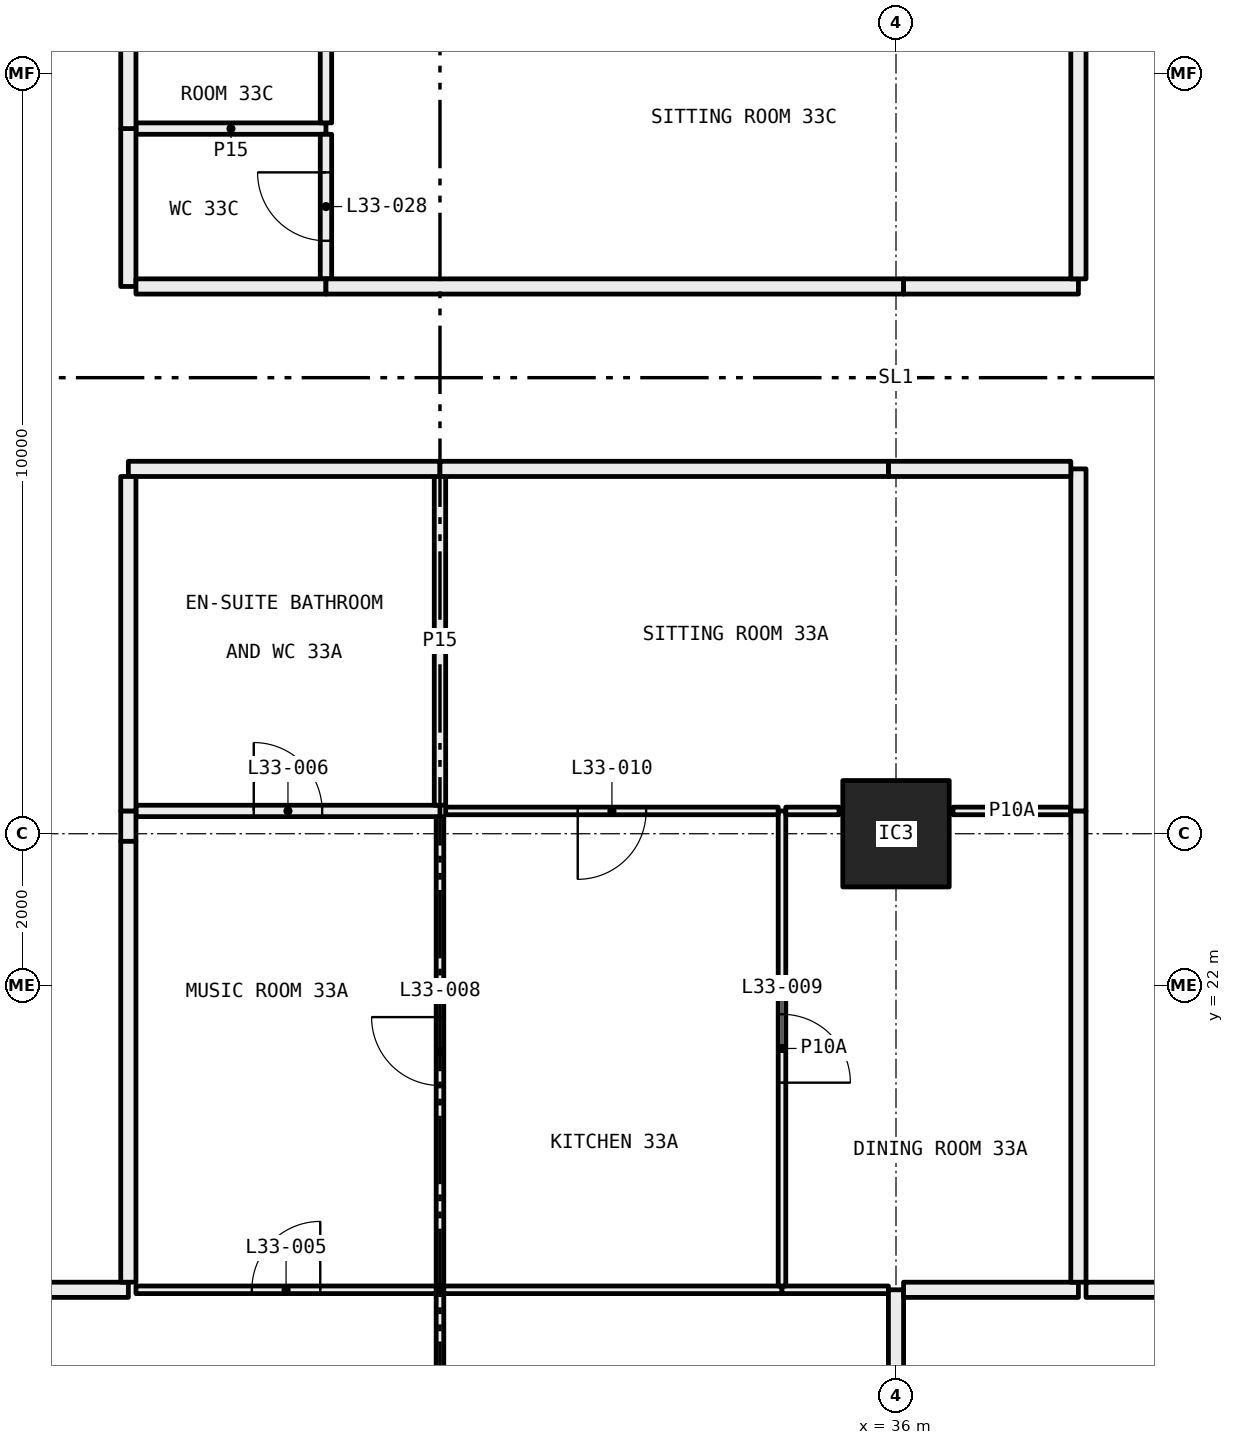
"""IFC4 building model, lengths in metres.
Left out: names, types, materials, properties, quantities, classifications, styles, units other than length and angle.
Written with IfcOpenShell. Run it as: python <this file> out.ifc"""

import sys

from ifc_helpers import new_model, si_unit, direction, frame, frame_2d, origin, origin_2d, place, context, subcontext, project, spatial, rectangle, hollow_rectangle, extrude, element, fill, save


model = new_model("IFC4")
c1 = context("Model", 3, precision=1e-05, world=origin(), true_north=direction((0.0, 1.0)))
c2 = subcontext(c1, "Body", "Model", "MODEL_VIEW")
j1 = project(units=[si_unit("LENGTHUNIT", "METRE"), si_unit("PLANEANGLEUNIT", "RADIAN")], contexts=[c1])
p1 = place(None, origin())
s1 = spatial("IfcSite", under=j1, at=p1, CompositionType="ELEMENT")
p2 = place(p1, origin())
s2 = spatial("IfcBuilding", under=s1, at=p2, CompositionType="ELEMENT")
p3 = place(p2, frame((0.0, 0.0, 127.65)))
s3 = spatial("IfcBuildingStorey", under=s2, at=p3, CompositionType="ELEMENT", Elevation=127.65)
p4 = place(p3, frame((36.0, 24.0, 0.0), z_axis=(0.0, 0.0, 1.0), x_axis=(1.0, 0.0, 0.0)))
e1 = element("IfcColumn", 1, at=p4, inside=s3, PredefinedType="COLUMN", context=c2, shape_type="SweptSolid", body=[
    extrude(hollow_rectangle(XDim=1.4, YDim=1.4, WallThickness=0.06, at=origin_2d()), origin(), (0.0, 0.0, 1.0), 3.05),
])
p5 = place(p3, frame((30.0, 12.72, 0.0), z_axis=(0.0, 0.0, 1.0), x_axis=(0.0, 1.0, 0.0)))
e2 = element("IfcWall", 2, at=p5, inside=s3, PredefinedType="PARTITIONING", context=c2, shape_type="SweptSolid", body=[
    extrude(rectangle(XDim=5.28, YDim=0.1, at=frame_2d((2.64, 0.0))), origin(), (0.0, 0.0, 1.0), 3.05),
])
p6 = place(p5, frame((2.19, 0.0, 0.0)))
e3 = element("IfcOpeningElement", 3, at=p6, cuts=e2, PredefinedType="OPENING", context=c2, shape_type="SweptSolid", body=[
    extrude(rectangle(XDim=0.9, YDim=2.1, at=frame_2d((0.45, 1.05))), frame((0.0, 0.06, 0.0), z_axis=(0.0, -1.0, 0.0), x_axis=(1.0, 0.0, 0.0)), (0.0, 0.0, 1.0), 0.12),
])
p7 = place(p3, frame((29.95, 18.0, 0.0), z_axis=(0.0, 0.0, 1.0), x_axis=(-1.0, 0.0, 0.0)))
e4 = element("IfcWall", 4, at=p7, inside=s3, PredefinedType="PARTITIONING", context=c2, shape_type="SweptSolid", body=[
    extrude(rectangle(XDim=3.95, YDim=0.1, at=frame_2d((1.975, 0.0))), origin(), (0.0, 0.0, 1.0), 3.05),
])
p8 = place(p7, frame((1.525, 0.0, 0.0)))
e5 = element("IfcOpeningElement", 5, at=p8, cuts=e4, PredefinedType="OPENING", context=c2, shape_type="SweptSolid", body=[
    extrude(rectangle(XDim=0.9, YDim=2.1, at=frame_2d((0.45, 1.05))), frame((0.0, 0.06, 0.0), z_axis=(0.0, -1.0, 0.0), x_axis=(1.0, 0.0, 0.0)), (0.0, 0.0, 1.0), 0.12),
])
p9 = place(p3, frame((25.9, 18.0, 0.0), z_axis=(0.0, 0.0, 1.0), x_axis=(-1.0, 0.0, 0.0)))
e6 = element("IfcWall", 6, at=p9, inside=s3, PredefinedType="PARTITIONING", context=c2, shape_type="SweptSolid", body=[
    extrude(rectangle(XDim=1.9, YDim=0.2, at=frame_2d((0.95, 0.0))), origin(), (0.0, 0.0, 1.0), 3.05),
])
p10 = place(p3, frame((34.5, 18.0, 0.0), z_axis=(0.0, 0.0, 1.0), x_axis=(-1.0, 0.0, 0.0)))
e7 = element("IfcWall", 7, at=p10, inside=s3, PredefinedType="PARTITIONING", context=c2, shape_type="SweptSolid", body=[
    extrude(rectangle(XDim=4.45, YDim=0.1, at=frame_2d((2.225, 0.0))), origin(), (0.0, 0.0, 1.0), 3.05),
])
p11 = place(p3, frame((35.9, 18.0, 0.0), z_axis=(0.0, 0.0, 1.0), x_axis=(-1.0, 0.0, 0.0)))
e8 = element("IfcWall", 8, at=p11, inside=s3, PredefinedType="PARTITIONING", context=c2, shape_type="SweptSolid", body=[
    extrude(rectangle(XDim=1.4, YDim=0.1, at=frame_2d((0.7, 0.0))), origin(), (0.0, 0.0, 1.0), 3.05),
])
p12 = place(p3, frame((36.0, 12.72, 0.0), z_axis=(0.0, 0.0, 1.0), x_axis=(0.0, 1.0, 0.0)))
e9 = element("IfcWall", 9, at=p12, inside=s3, PredefinedType="PARTITIONING", context=c2, shape_type="SweptSolid", body=[
    extrude(rectangle(XDim=5.28, YDim=0.2, at=frame_2d((2.64, 0.0))), origin(), (0.0, 0.0, 1.0), 2.45),
])
p13 = place(p3, frame((30.0, 18.05, 0.0), z_axis=(0.0, 0.0, 1.0), x_axis=(0.0, 1.0, 0.0)))
e10 = element("IfcWall", 10, at=p13, inside=s3, PredefinedType="PARTITIONING", context=c2, shape_type="SweptSolid", body=[
    extrude(rectangle(XDim=6.175, YDim=0.1, at=frame_2d((3.087, 0.0))), origin(), (0.0, 0.0, 1.0), 2.45),
])
p14 = place(p13, frame((2.637, 0.0, 0.0)))
e11 = element("IfcOpeningElement", 11, at=p14, cuts=e10, PredefinedType="OPENING", context=c2, shape_type="SweptSolid", body=[
    extrude(rectangle(XDim=0.9, YDim=2.1, at=frame_2d((0.45, 1.05))), frame((0.0, 0.06, 0.0), z_axis=(0.0, -1.0, 0.0), x_axis=(1.0, 0.0, 0.0)), (0.0, 0.0, 1.0), 0.12),
])
p15 = place(p3, frame((30.0, 24.3, 0.0), z_axis=(0.0, 0.0, 1.0), x_axis=(-1.0, 0.0, 0.0)))
e12 = element("IfcWall", 12, at=p15, inside=s3, PredefinedType="PARTITIONING", context=c2, shape_type="SweptSolid", body=[
    extrude(rectangle(XDim=4.0, YDim=0.15, at=frame_2d((2.0, 0.0))), origin(), (0.0, 0.0, 1.0), 3.05),
])
p16 = place(p15, frame((1.55, 0.0, 0.0)))
e13 = element("IfcOpeningElement", 13, at=p16, cuts=e12, PredefinedType="OPENING", context=c2, shape_type="SweptSolid", body=[
    extrude(rectangle(XDim=0.9, YDim=2.1, at=frame_2d((0.45, 1.05))), frame((0.0, 0.085, 0.0), z_axis=(0.0, -1.0, 0.0), x_axis=(1.0, 0.0, 0.0)), (0.0, 0.0, 1.0), 0.17),
])
p17 = place(p3, frame((25.9, 24.3, 0.0), z_axis=(0.0, 0.0, 1.0), x_axis=(0.0, -1.0, 0.0)))
e14 = element("IfcWall", 14, at=p17, inside=s3, PredefinedType="PARTITIONING", context=c2, shape_type="SweptSolid", body=[
    extrude(rectangle(XDim=0.4, YDim=0.2, at=frame_2d((0.2, 0.0))), origin(), (0.0, 0.0, 1.0), 2.45),
])
p18 = place(p3, frame((25.9, 23.9, 0.0), z_axis=(0.0, 0.0, 1.0), x_axis=(0.0, -1.0, 0.0)))
e15 = element("IfcWall", 15, at=p18, inside=s3, PredefinedType="PARTITIONING", context=c2, shape_type="SweptSolid", body=[
    extrude(rectangle(XDim=5.8, YDim=0.2, at=frame_2d((2.9, 0.0))), origin(), (0.0, 0.0, 1.0), 3.05),
])
p19 = place(p3, frame((34.5, 18.05, 0.0), z_axis=(0.0, 0.0, 1.0), x_axis=(0.0, 1.0, 0.0)))
e16 = element("IfcWall", 16, at=p19, inside=s3, PredefinedType="PARTITIONING", context=c2, shape_type="SweptSolid", body=[
    extrude(rectangle(XDim=6.25, YDim=0.1, at=frame_2d((3.125, 0.0))), origin(), (0.0, 0.0, 1.0), 2.45),
])
p20 = place(p19, frame((2.675, 0.0, 0.0)))
e17 = element("IfcOpeningElement", 17, at=p20, cuts=e16, PredefinedType="OPENING", context=c2, shape_type="SweptSolid", body=[
    extrude(rectangle(XDim=0.9, YDim=2.1, at=frame_2d((0.45, 1.05))), frame((0.0, 0.06, 0.0), z_axis=(0.0, -1.0, 0.0), x_axis=(1.0, 0.0, 0.0)), (0.0, 0.0, 1.0), 0.12),
])
p21 = place(p3, frame((34.45, 24.3, 0.0), z_axis=(0.0, 0.0, 1.0), x_axis=(-1.0, 0.0, 0.0)))
e18 = element("IfcWall", 18, at=p21, inside=s3, PredefinedType="PARTITIONING", context=c2, shape_type="SweptSolid", body=[
    extrude(rectangle(XDim=4.375, YDim=0.1, at=frame_2d((2.188, 0.0))), origin(), (0.0, 0.0, 1.0), 3.05),
])
p22 = place(p21, frame((1.738, 0.0, 0.0)))
e19 = element("IfcOpeningElement", 19, at=p22, cuts=e18, PredefinedType="OPENING", context=c2, shape_type="SweptSolid", body=[
    extrude(rectangle(XDim=0.9, YDim=2.1, at=frame_2d((0.45, 1.05))), frame((0.0, 0.06, 0.0), z_axis=(0.0, -1.0, 0.0), x_axis=(1.0, 0.0, 0.0)), (0.0, 0.0, 1.0), 0.12),
])
p23 = place(p3, frame((35.25, 24.3, 0.0), z_axis=(0.0, 0.0, 1.0), x_axis=(-1.0, 0.0, 0.0)))
e20 = element("IfcWall", 20, at=p23, inside=s3, PredefinedType="PARTITIONING", context=c2, shape_type="SweptSolid", body=[
    extrude(rectangle(XDim=0.7, YDim=0.1, at=frame_2d((0.35, 0.0))), origin(), (0.0, 0.0, 1.0), 3.05),
])
p24 = place(p3, frame((38.3, 24.3, 0.0), z_axis=(0.0, 0.0, 1.0), x_axis=(-1.0, 0.0, 0.0)))
e21 = element("IfcWall", 21, at=p24, inside=s3, PredefinedType="PARTITIONING", context=c2, shape_type="SweptSolid", body=[
    extrude(rectangle(XDim=1.55, YDim=0.1, at=frame_2d((0.775, 0.0))), origin(), (0.0, 0.0, 1.0), 3.05),
])
p25 = place(p3, frame((36.1, 18.0, 0.0), z_axis=(0.0, 0.0, 1.0), x_axis=(1.0, 0.0, 0.0)))
e22 = element("IfcWall", 22, at=p25, inside=s3, PredefinedType="PARTITIONING", context=c2, shape_type="SweptSolid", body=[
    extrude(rectangle(XDim=2.3, YDim=0.2, at=frame_2d((1.15, 0.0))), origin(), (0.0, 0.0, 1.0), 3.05),
])
p26 = place(p3, frame((38.4, 18.1, 0.0), z_axis=(0.0, 0.0, 1.0), x_axis=(0.0, 1.0, 0.0)))
e23 = element("IfcWall", 23, at=p26, inside=s3, PredefinedType="PARTITIONING", context=c2, shape_type="SweptSolid", body=[
    extrude(rectangle(XDim=6.2, YDim=0.2, at=frame_2d((3.1, 0.0))), origin(), (0.0, 0.0, 1.0), 2.45),
])
p27 = place(p3, frame((30.0, 24.375, 0.0), z_axis=(0.0, 0.0, 1.0), x_axis=(0.0, 1.0, 0.0)))
e24 = element("IfcWall", 24, at=p27, inside=s3, PredefinedType="PARTITIONING", context=c2, shape_type="SweptSolid", body=[
    extrude(rectangle(XDim=4.325, YDim=0.15, at=frame_2d((2.163, 0.0))), origin(), (0.0, 0.0, 1.0), 3.05),
])
p28 = place(p3, frame((30.0, 28.8, 0.0), z_axis=(0.0, 0.0, 1.0), x_axis=(-1.0, 0.0, 0.0)))
e25 = element("IfcWall", 25, at=p28, inside=s3, PredefinedType="PARTITIONING", context=c2, shape_type="SweptSolid", body=[
    extrude(rectangle(XDim=4.1, YDim=0.2, at=frame_2d((2.05, 0.0))), origin(), (0.0, 0.0, 1.0), 3.05),
])
p29 = place(p3, frame((25.9, 28.7, 0.0), z_axis=(0.0, 0.0, 1.0), x_axis=(0.0, -1.0, 0.0)))
e26 = element("IfcWall", 26, at=p29, inside=s3, PredefinedType="PARTITIONING", context=c2, shape_type="SweptSolid", body=[
    extrude(rectangle(XDim=4.4, YDim=0.2, at=frame_2d((2.2, 0.0))), origin(), (0.0, 0.0, 1.0), 3.05),
])
p30 = place(p3, frame((38.4, 24.3, 0.0), z_axis=(0.0, 0.0, 1.0), x_axis=(0.0, 1.0, 0.0)))
e27 = element("IfcWall", 27, at=p30, inside=s3, PredefinedType="PARTITIONING", context=c2, shape_type="SweptSolid", body=[
    extrude(rectangle(XDim=4.5, YDim=0.2, at=frame_2d((2.25, 0.0))), origin(), (0.0, 0.0, 1.0), 3.05),
])
p31 = place(p3, frame((38.3, 28.8, 0.0), z_axis=(0.0, 0.0, 1.0), x_axis=(-1.0, 0.0, 0.0)))
e28 = element("IfcWall", 28, at=p31, inside=s3, PredefinedType="PARTITIONING", context=c2, shape_type="SweptSolid", body=[
    extrude(rectangle(XDim=2.4, YDim=0.2, at=frame_2d((1.2, 0.0))), origin(), (0.0, 0.0, 1.0), 2.45),
])
p32 = place(p3, frame((35.9, 28.8, 0.0), z_axis=(0.0, 0.0, 1.0), x_axis=(-1.0, 0.0, 0.0)))
e29 = element("IfcWall", 29, at=p32, inside=s3, PredefinedType="PARTITIONING", context=c2, shape_type="SweptSolid", body=[
    extrude(rectangle(XDim=5.9, YDim=0.2, at=frame_2d((2.95, 0.0))), origin(), (0.0, 0.0, 1.0), 3.05),
])
p33 = place(p3, frame((40.8, 18.0, 0.0), z_axis=(0.0, 0.0, 1.0), x_axis=(-1.0, 0.0, 0.0)))
e30 = element("IfcWall", 30, at=p33, inside=s3, PredefinedType="PARTITIONING", context=c2, shape_type="SweptSolid", body=[
    extrude(rectangle(XDim=2.3, YDim=0.2, at=frame_2d((1.15, 0.0))), origin(), (0.0, 0.0, 1.0), 3.05),
])
p34 = place(p3, frame((28.5, 33.277, 0.0), z_axis=(0.0, 0.0, 1.0), x_axis=(-1.0, 0.0, 0.0)))
e31 = element("IfcWall", 31, at=p34, inside=s3, PredefinedType="PARTITIONING", context=c2, shape_type="SweptSolid", body=[
    extrude(rectangle(XDim=2.5, YDim=0.15, at=frame_2d((1.25, 0.0))), origin(), (0.0, 0.0, 1.0), 3.05),
])
p35 = place(p3, frame((28.5, 31.3, 0.0), z_axis=(0.0, 0.0, 1.0), x_axis=(0.0, 1.0, 0.0)))
e32 = element("IfcWall", 32, at=p35, inside=s3, PredefinedType="PARTITIONING", context=c2, shape_type="SweptSolid", body=[
    extrude(rectangle(XDim=1.902, YDim=0.15, at=frame_2d((0.951, 0.0))), origin(), (0.0, 0.0, 1.0), 3.05),
])
p36 = place(p35, frame((0.501, 0.0, 0.0)))
e33 = element("IfcOpeningElement", 33, at=p36, cuts=e32, PredefinedType="OPENING", context=c2, shape_type="SweptSolid", body=[
    extrude(rectangle(XDim=0.9, YDim=2.1, at=frame_2d((0.45, 1.05))), frame((0.0, 0.085, 0.0), z_axis=(0.0, -1.0, 0.0), x_axis=(1.0, 0.0, 0.0)), (0.0, 0.0, 1.0), 0.17),
])
p37 = place(p3, frame((25.9, 33.277, 0.0), z_axis=(0.0, 0.0, 1.0), x_axis=(0.0, -1.0, 0.0)))
e34 = element("IfcWall", 34, at=p37, inside=s3, PredefinedType="PARTITIONING", context=c2, shape_type="SweptSolid", body=[
    extrude(rectangle(XDim=2.077, YDim=0.2, at=frame_2d((1.039, 0.0))), origin(), (0.0, 0.0, 1.0), 3.05),
])
p38 = place(p3, frame((26.0, 31.2, 0.0), z_axis=(0.0, 0.0, 1.0), x_axis=(1.0, 0.0, 0.0)))
e35 = element("IfcWall", 35, at=p38, inside=s3, PredefinedType="PARTITIONING", context=c2, shape_type="SweptSolid", body=[
    extrude(rectangle(XDim=2.5, YDim=0.2, at=frame_2d((1.25, 0.0))), origin(), (0.0, 0.0, 1.0), 3.05),
])
p39 = place(p3, frame((28.5, 33.352, 0.0), z_axis=(0.0, 0.0, 1.0), x_axis=(0.0, 1.0, 0.0)))
e36 = element("IfcWall", 36, at=p39, inside=s3, PredefinedType="PARTITIONING", context=c2, shape_type="SweptSolid", body=[
    extrude(rectangle(XDim=2.273, YDim=0.15, at=frame_2d((1.136, 0.0))), origin(), (0.0, 0.0, 1.0), 3.05),
])
p40 = place(p3, frame((25.9, 35.7, 0.0), z_axis=(0.0, 0.0, 1.0), x_axis=(0.0, -1.0, 0.0)))
e37 = element("IfcWall", 37, at=p40, inside=s3, PredefinedType="PARTITIONING", context=c2, shape_type="SweptSolid", body=[
    extrude(rectangle(XDim=2.423, YDim=0.2, at=frame_2d((1.211, 0.0))), origin(), (0.0, 0.0, 1.0), 3.05),
])
p41 = place(p3, frame((28.5, 31.2, 0.0), z_axis=(0.0, 0.0, 1.0), x_axis=(1.0, 0.0, 0.0)))
e38 = element("IfcWall", 38, at=p41, inside=s3, PredefinedType="PARTITIONING", context=c2, shape_type="SweptSolid", body=[
    extrude(rectangle(XDim=7.6, YDim=0.2, at=frame_2d((3.8, 0.0))), origin(), (0.0, 0.0, 1.0), 2.45),
])
p42 = place(p3, frame((36.1, 31.2, 0.0), z_axis=(0.0, 0.0, 1.0), x_axis=(1.0, 0.0, 0.0)))
e39 = element("IfcWall", 39, at=p42, inside=s3, PredefinedType="PARTITIONING", context=c2, shape_type="SweptSolid", body=[
    extrude(rectangle(XDim=2.3, YDim=0.2, at=frame_2d((1.15, 0.0))), origin(), (0.0, 0.0, 1.0), 3.05),
])
p43 = place(p3, frame((38.4, 31.3, 0.0), z_axis=(0.0, 0.0, 1.0), x_axis=(0.0, 1.0, 0.0)))
e40 = element("IfcWall", 40, at=p43, inside=s3, PredefinedType="PARTITIONING", context=c2, shape_type="SweptSolid", body=[
    extrude(rectangle(XDim=4.4, YDim=0.2, at=frame_2d((2.2, 0.0))), origin(), (0.0, 0.0, 1.0), 3.05),
])
p44 = place(p8, frame((0.9, 0.0, 0.0), x_axis=(-1.0, 0.0, 0.0)))
e41 = element("IfcDoor", 41, at=p44, inside=s3, OperationType="SINGLE_SWING_LEFT", PredefinedType="DOOR", context=c2, shape_type="SweptSolid", body=[
    extrude(rectangle(XDim=0.9, YDim=2.1, at=frame_2d((0.45, 1.05))), frame((0.0, 0.025, 0.0), z_axis=(0.0, -1.0, 0.0), x_axis=(1.0, 0.0, 0.0)), (0.0, 0.0, 1.0), 0.05),
])
fill(e5, e41)
p45 = place(p16, frame((0.9, 0.0, 0.0), x_axis=(-1.0, 0.0, 0.0)))
e42 = element("IfcDoor", 42, at=p45, inside=s3, OperationType="SINGLE_SWING_RIGHT", PredefinedType="DOOR", context=c2, shape_type="SweptSolid", body=[
    extrude(rectangle(XDim=0.9, YDim=2.1, at=frame_2d((0.45, 1.05))), frame((0.0, 0.025, 0.0), z_axis=(0.0, -1.0, 0.0), x_axis=(1.0, 0.0, 0.0)), (0.0, 0.0, 1.0), 0.05),
])
fill(e13, e42)
p46 = place(p14, origin())
e43 = element("IfcDoor", 43, at=p46, inside=s3, OperationType="SINGLE_SWING_LEFT", PredefinedType="DOOR", context=c2, shape_type="SweptSolid", body=[
    extrude(rectangle(XDim=0.9, YDim=2.1, at=frame_2d((0.45, 1.05))), frame((0.0, 0.025, 0.0), z_axis=(0.0, -1.0, 0.0), x_axis=(1.0, 0.0, 0.0)), (0.0, 0.0, 1.0), 0.05),
])
fill(e11, e43)
p47 = place(p20, frame((0.9, 0.0, 0.0), x_axis=(-1.0, 0.0, 0.0)))
e44 = element("IfcDoor", 44, at=p47, inside=s3, OperationType="SINGLE_SWING_LEFT", PredefinedType="DOOR", context=c2, shape_type="SweptSolid", body=[
    extrude(rectangle(XDim=0.9, YDim=2.1, at=frame_2d((0.45, 1.05))), frame((0.0, 0.025, 0.0), z_axis=(0.0, -1.0, 0.0), x_axis=(1.0, 0.0, 0.0)), (0.0, 0.0, 1.0), 0.05),
])
fill(e17, e44)
p48 = place(p22, origin())
e45 = element("IfcDoor", 45, at=p48, inside=s3, OperationType="SINGLE_SWING_LEFT", PredefinedType="DOOR", context=c2, shape_type="SweptSolid", body=[
    extrude(rectangle(XDim=0.9, YDim=2.1, at=frame_2d((0.45, 1.05))), frame((0.0, 0.025, 0.0), z_axis=(0.0, -1.0, 0.0), x_axis=(1.0, 0.0, 0.0)), (0.0, 0.0, 1.0), 0.05),
])
fill(e19, e45)
p49 = place(p36, origin())
e46 = element("IfcDoor", 46, at=p49, inside=s3, OperationType="SINGLE_SWING_LEFT", PredefinedType="DOOR", context=c2, shape_type="SweptSolid", body=[
    extrude(rectangle(XDim=0.9, YDim=2.1, at=frame_2d((0.45, 1.05))), frame((0.0, 0.025, 0.0), z_axis=(0.0, -1.0, 0.0), x_axis=(1.0, 0.0, 0.0)), (0.0, 0.0, 1.0), 0.05),
])
fill(e33, e46)
save(model, sys.argv[1])
